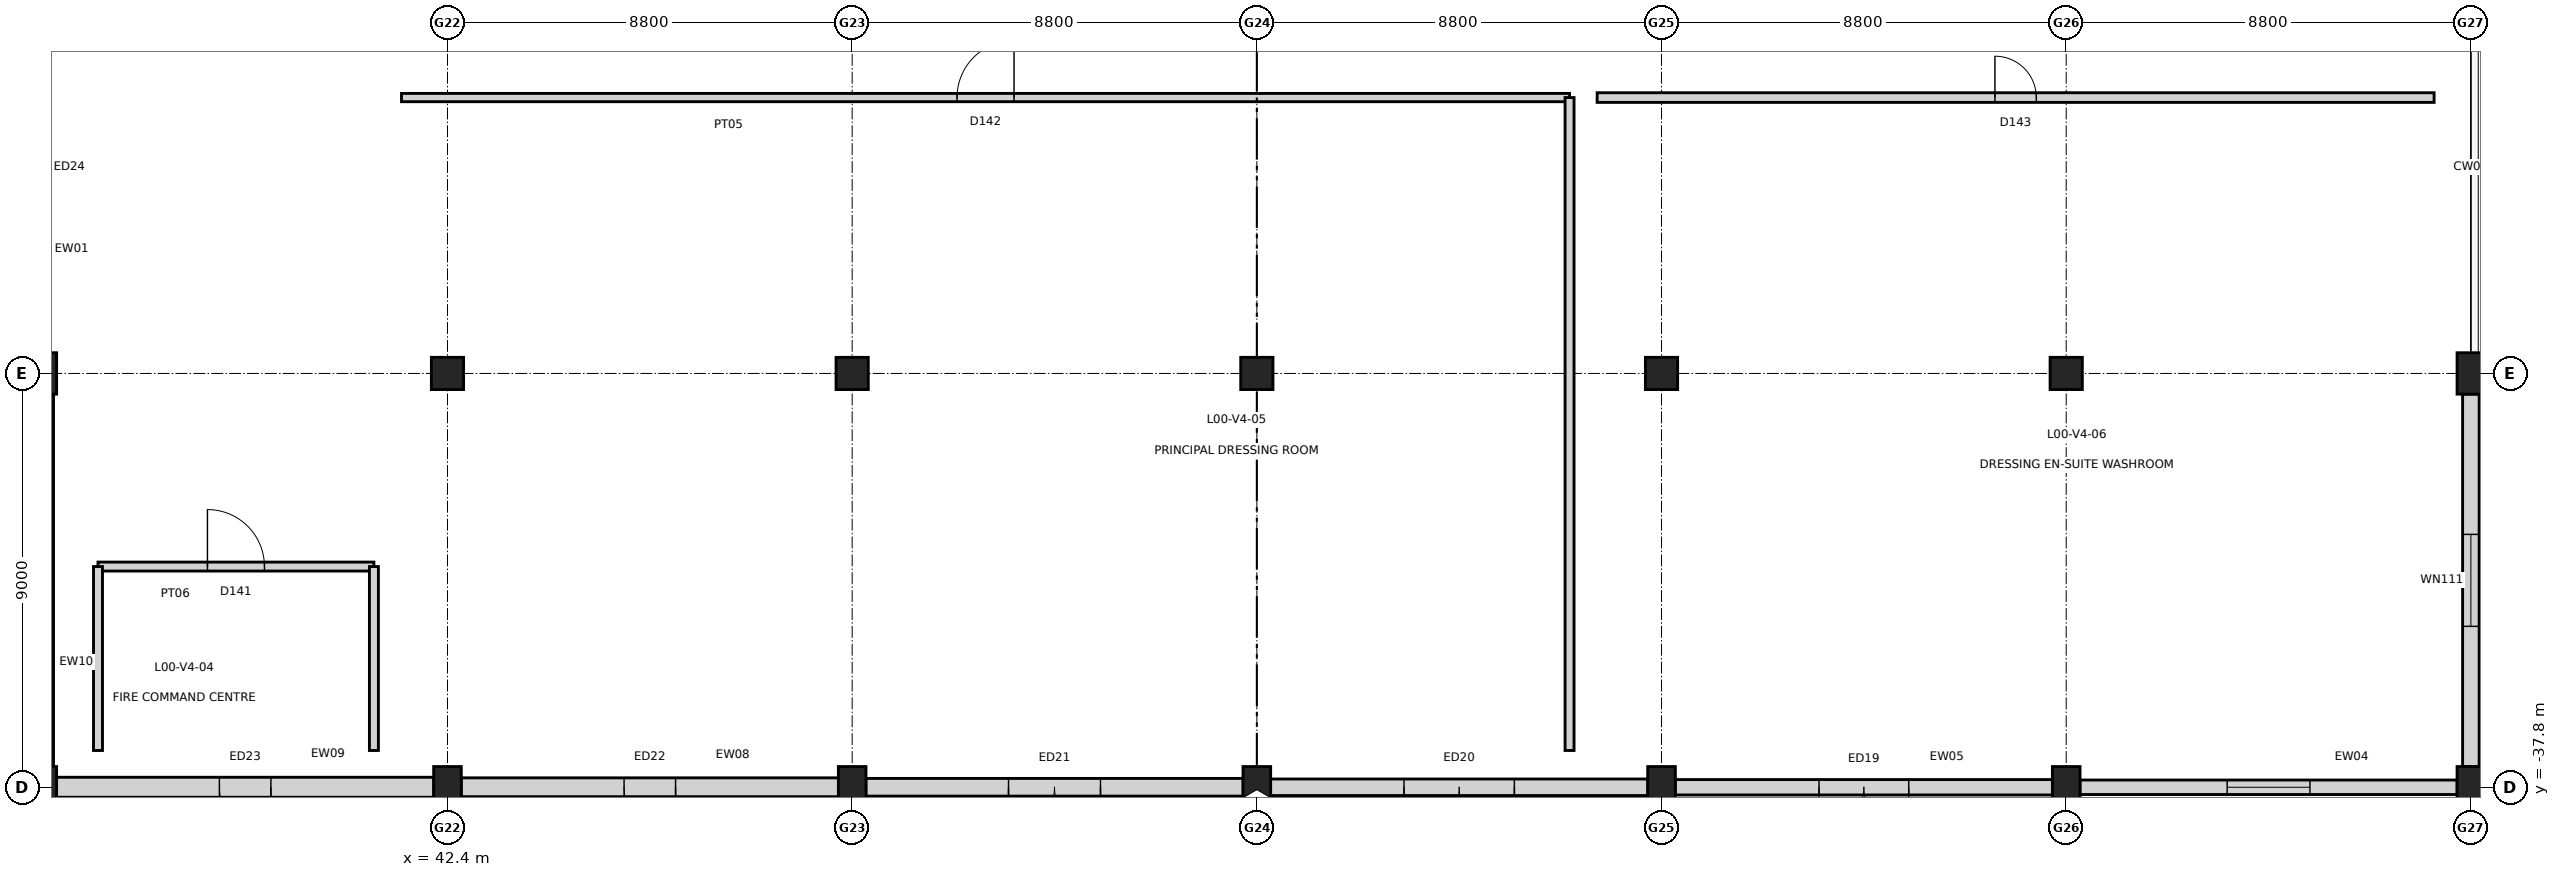
"""IFC4 building model, lengths in metres.
Left out: names, types, materials, properties, quantities, classifications, styles, units other than length and angle.
Written with IfcOpenShell. Run it as: python <this file> out.ifc"""

import sys

from ifc_helpers import new_model, si_unit, direction, frame, frame_2d, origin, origin_2d, place, context, subcontext, project, spatial, rectangle, extrude, element, fill, save


model = new_model("IFC4")
c1 = context("Model", 3, precision=1e-05, world=origin(), true_north=direction((0.0, 1.0)))
c2 = subcontext(c1, "Body", "Model", "MODEL_VIEW")
j1 = project(units=[si_unit("LENGTHUNIT", "METRE"), si_unit("PLANEANGLEUNIT", "RADIAN")], contexts=[c1])
p1 = place(None, origin())
s1 = spatial("IfcSite", under=j1, at=p1, CompositionType="ELEMENT")
p2 = place(p1, origin())
s2 = spatial("IfcBuilding", under=s1, at=p2, CompositionType="ELEMENT")
p3 = place(p2, origin())
s3 = spatial("IfcBuildingStorey", under=s2, at=p3, CompositionType="ELEMENT", Elevation=0.0)
for number, where, z_axis, x_axis in (
    (1, (33.6, -37.8, 0.0), (0.0, 0.0, 1.0), (1.0, 0.0, 0.0)),
    (2, (33.6, -28.8, 0.0), (0.0, 0.0, 1.0), (1.0, 0.0, 0.0)),
    (3, (42.4, -37.8, 0.0), (0.0, 0.0, 1.0), (1.0, 0.0, 0.0)),
):
    element("IfcColumn", number, at=place(p3, frame(where, z_axis=z_axis, x_axis=x_axis)), inside=s3, PredefinedType="COLUMN", context=c2, shape_type="SweptSolid", body=[
        extrude(rectangle(XDim=0.6, YDim=0.9, at=origin_2d()), origin(), (0.0, 0.0, 1.0), 5.4),
    ])
p4 = place(p3, frame((42.4, -28.8, 0.0), z_axis=(0.0, 0.0, 1.0), x_axis=(1.0, 0.0, 0.0)))
e4 = element("IfcColumn", 4, at=p4, inside=s3, PredefinedType="COLUMN", context=c2, shape_type="SweptSolid", body=[
    extrude(rectangle(XDim=0.7, YDim=0.7, at=origin_2d()), origin(), (0.0, 0.0, 1.0), 5.4),
])
p5 = place(p3, frame((51.2, -37.8, 0.0), z_axis=(0.0, 0.0, 1.0), x_axis=(1.0, 0.0, 0.0)))
e5 = element("IfcColumn", 5, at=p5, inside=s3, PredefinedType="COLUMN", context=c2, shape_type="SweptSolid", body=[
    extrude(rectangle(XDim=0.6, YDim=0.9, at=origin_2d()), origin(), (0.0, 0.0, 1.0), 5.4),
])
p6 = place(p3, frame((51.2, -28.8, 0.0), z_axis=(0.0, 0.0, 1.0), x_axis=(1.0, 0.0, 0.0)))
e6 = element("IfcColumn", 6, at=p6, inside=s3, PredefinedType="COLUMN", context=c2, shape_type="SweptSolid", body=[
    extrude(rectangle(XDim=0.7, YDim=0.7, at=origin_2d()), origin(), (0.0, 0.0, 1.0), 5.4),
])
p7 = place(p3, frame((60.0, -37.8, 0.0), z_axis=(0.0, 0.0, 1.0), x_axis=(1.0, 0.0, 0.0)))
e7 = element("IfcColumn", 7, at=p7, inside=s3, PredefinedType="COLUMN", context=c2, shape_type="SweptSolid", body=[
    extrude(rectangle(XDim=0.6, YDim=0.9, at=origin_2d()), origin(), (0.0, 0.0, 1.0), 5.4),
])
p8 = place(p3, frame((60.0, -28.8, 0.0), z_axis=(0.0, 0.0, 1.0), x_axis=(1.0, 0.0, 0.0)))
e8 = element("IfcColumn", 8, at=p8, inside=s3, PredefinedType="COLUMN", context=c2, shape_type="SweptSolid", body=[
    extrude(rectangle(XDim=0.7, YDim=0.7, at=origin_2d()), origin(), (0.0, 0.0, 1.0), 5.4),
])
p9 = place(p3, frame((68.8, -37.8, 0.0), z_axis=(0.0, 0.0, 1.0), x_axis=(1.0, 0.0, 0.0)))
e9 = element("IfcColumn", 9, at=p9, inside=s3, PredefinedType="COLUMN", context=c2, shape_type="SweptSolid", body=[
    extrude(rectangle(XDim=0.6, YDim=0.9, at=origin_2d()), origin(), (0.0, 0.0, 1.0), 5.4),
])
p10 = place(p3, frame((68.8, -28.8, 0.0), z_axis=(0.0, 0.0, 1.0), x_axis=(1.0, 0.0, 0.0)))
e10 = element("IfcColumn", 10, at=p10, inside=s3, PredefinedType="COLUMN", context=c2, shape_type="SweptSolid", body=[
    extrude(rectangle(XDim=0.7, YDim=0.7, at=origin_2d()), origin(), (0.0, 0.0, 1.0), 5.4),
])
p11 = place(p3, frame((77.6, -37.8, 0.0), z_axis=(0.0, 0.0, 1.0), x_axis=(1.0, 0.0, 0.0)))
e11 = element("IfcColumn", 11, at=p11, inside=s3, PredefinedType="COLUMN", context=c2, shape_type="SweptSolid", body=[
    extrude(rectangle(XDim=0.6, YDim=0.9, at=origin_2d()), origin(), (0.0, 0.0, 1.0), 5.4),
])
p12 = place(p3, frame((77.6, -28.8, 0.0), z_axis=(0.0, 0.0, 1.0), x_axis=(1.0, 0.0, 0.0)))
e12 = element("IfcColumn", 12, at=p12, inside=s3, PredefinedType="COLUMN", context=c2, shape_type="SweptSolid", body=[
    extrude(rectangle(XDim=0.7, YDim=0.7, at=origin_2d()), origin(), (0.0, 0.0, 1.0), 5.4),
])
for number, where, z_axis, x_axis in (
    (13, (86.4, -37.8, 0.0), (0.0, 0.0, 1.0), (1.0, 0.0, 0.0)),
    (14, (86.4, -28.8, 0.0), (0.0, 0.0, 1.0), (1.0, 0.0, 0.0)),
):
    element("IfcColumn", number, at=place(p3, frame(where, z_axis=z_axis, x_axis=x_axis)), inside=s3, PredefinedType="COLUMN", context=c2, shape_type="SweptSolid", body=[
        extrude(rectangle(XDim=0.6, YDim=0.9, at=origin_2d()), origin(), (0.0, 0.0, 1.0), 5.4),
    ])
p13 = place(p3, frame((86.102, -37.8, 0.0), z_axis=(0.0, 0.0, 1.0), x_axis=(-1.0, 0.0, 0.0)))
e15 = element("IfcWall", 15, at=p13, inside=s3, PredefinedType="STANDARD", context=c2, shape_type="SweptSolid", body=[
    extrude(rectangle(XDim=8.204, YDim=0.315, at=frame_2d((4.102, 0.0))), origin(), (0.0, 0.0, 1.0), 4.32),
])
p14 = place(p13, frame((3.202, 0.0, 0.6)))
e16 = element("IfcOpeningElement", 16, at=p14, cuts=e15, PredefinedType="OPENING", context=c2, shape_type="SweptSolid", body=[
    extrude(rectangle(XDim=1.8, YDim=2.35, at=frame_2d((0.9, 1.175))), frame((0.0, 0.167, 0.0), z_axis=(0.0, -1.0, 0.0), x_axis=(1.0, 0.0, 0.0)), (0.0, 0.0, 1.0), 0.335),
])
p15 = place(p3, frame((77.302, -37.8, 0.0), z_axis=(0.0, 0.0, 1.0), x_axis=(-1.0, 0.0, 0.0)))
e17 = element("IfcWall", 17, at=p15, inside=s3, PredefinedType="STANDARD", context=c2, shape_type="SweptSolid", body=[
    extrude(rectangle(XDim=8.204, YDim=0.335, at=frame_2d((4.102, 0.0))), origin(), (0.0, 0.0, 1.0), 4.32),
])
p16 = place(p15, frame((3.127, 0.0, 0.0)))
e18 = element("IfcOpeningElement", 18, at=p16, cuts=e17, PredefinedType="OPENING", context=c2, shape_type="SweptSolid", body=[
    extrude(rectangle(XDim=1.95, YDim=2.35, at=frame_2d((0.975, 1.175))), frame((0.0, 0.177, 0.0), z_axis=(0.0, -1.0, 0.0), x_axis=(1.0, 0.0, 0.0)), (0.0, 0.0, 1.0), 0.355),
])
p17 = place(p3, frame((68.502, -37.8, 0.0), z_axis=(0.0, 0.0, 1.0), x_axis=(-1.0, 0.0, 0.0)))
e19 = element("IfcWall", 19, at=p17, inside=s3, PredefinedType="STANDARD", context=c2, shape_type="SweptSolid", body=[
    extrude(rectangle(XDim=8.204, YDim=0.36, at=frame_2d((4.102, 0.0))), origin(), (0.0, 0.0, 1.0), 4.32),
])
p18 = place(p17, frame((2.902, 0.0, 0.0)))
e20 = element("IfcOpeningElement", 20, at=p18, cuts=e19, PredefinedType="OPENING", context=c2, shape_type="SweptSolid", body=[
    extrude(rectangle(XDim=2.4, YDim=2.5, at=frame_2d((1.2, 1.25))), frame((0.0, 0.19, 0.0), z_axis=(0.0, -1.0, 0.0), x_axis=(1.0, 0.0, 0.0)), (0.0, 0.0, 1.0), 0.38),
])
p19 = place(p3, frame((59.702, -37.8, 0.0), z_axis=(0.0, 0.0, 1.0), x_axis=(-1.0, 0.0, 0.0)))
e21 = element("IfcWall", 21, at=p19, inside=s3, PredefinedType="STANDARD", context=c2, shape_type="SweptSolid", body=[
    extrude(rectangle(XDim=8.204, YDim=0.385, at=frame_2d((4.102, 0.0))), origin(), (0.0, 0.0, 1.0), 4.32),
])
p20 = place(p19, frame((3.102, 0.0, 0.0)))
e22 = element("IfcOpeningElement", 22, at=p20, cuts=e21, PredefinedType="OPENING", context=c2, shape_type="SweptSolid", body=[
    extrude(rectangle(XDim=2.0, YDim=2.4, at=frame_2d((1.0, 1.2))), frame((0.0, 0.202, 0.0), z_axis=(0.0, -1.0, 0.0), x_axis=(1.0, 0.0, 0.0)), (0.0, 0.0, 1.0), 0.405),
])
p21 = place(p3, frame((50.902, -37.8, 0.0), z_axis=(0.0, 0.0, 1.0), x_axis=(-1.0, 0.0, 0.0)))
e23 = element("IfcWall", 23, at=p21, inside=s3, PredefinedType="STANDARD", context=c2, shape_type="SweptSolid", body=[
    extrude(rectangle(XDim=8.204, YDim=0.41, at=frame_2d((4.102, 0.0))), origin(), (0.0, 0.0, 1.0), 4.32),
])
p22 = place(p21, frame((3.542, 0.0, 0.0)))
e24 = element("IfcOpeningElement", 24, at=p22, cuts=e23, PredefinedType="OPENING", context=c2, shape_type="SweptSolid", body=[
    extrude(rectangle(XDim=1.12, YDim=2.2, at=frame_2d((0.56, 1.1))), frame((0.0, 0.215, 0.0), z_axis=(0.0, -1.0, 0.0), x_axis=(1.0, 0.0, 0.0)), (0.0, 0.0, 1.0), 0.43),
])
p23 = place(p3, frame((42.102, -37.8, 0.0), z_axis=(0.0, 0.0, 1.0), x_axis=(-1.0, 0.0, 0.0)))
e25 = element("IfcWall", 25, at=p23, inside=s3, PredefinedType="STANDARD", context=c2, shape_type="SweptSolid", body=[
    extrude(rectangle(XDim=8.204, YDim=0.435, at=frame_2d((4.102, 0.0))), origin(), (0.0, 0.0, 1.0), 4.32),
])
p24 = place(p23, frame((3.542, 0.0, 0.0)))
e26 = element("IfcOpeningElement", 26, at=p24, cuts=e25, PredefinedType="OPENING", context=c2, shape_type="SweptSolid", body=[
    extrude(rectangle(XDim=1.12, YDim=2.2, at=frame_2d((0.56, 1.1))), frame((0.0, 0.228, 0.0), z_axis=(0.0, -1.0, 0.0), x_axis=(1.0, 0.0, 0.0)), (0.0, 0.0, 1.0), 0.455),
])
p25 = place(p3, frame((33.6, -37.352, 0.0), z_axis=(0.0, 0.0, 1.0), x_axis=(0.0, 1.0, 0.0)))
e27 = element("IfcWall", 27, at=p25, inside=s3, PredefinedType="STANDARD", context=c2, shape_type="SweptSolid", body=[
    extrude(rectangle(XDim=8.104, YDim=0.465, at=frame_2d((4.052, 0.0))), origin(), (0.0, 0.0, 1.0), 4.404),
])
p26 = place(p25, frame((3.002, 0.0, 0.6)))
e28 = element("IfcOpeningElement", 28, at=p26, cuts=e27, PredefinedType="OPENING", context=c2, shape_type="SweptSolid", body=[
    extrude(rectangle(XDim=2.1, YDim=2.35, at=frame_2d((1.05, 1.175))), frame((0.0, 0.242, 0.0), z_axis=(0.0, -1.0, 0.0), x_axis=(1.0, 0.0, 0.0)), (0.0, 0.0, 1.0), 0.485),
])
p27 = place(p3, frame((86.4, -29.248, 0.0), z_axis=(0.0, 0.0, 1.0), x_axis=(0.0, -1.0, 0.0)))
e29 = element("IfcWall", 29, at=p27, inside=s3, PredefinedType="STANDARD", context=c2, shape_type="SweptSolid", body=[
    extrude(rectangle(XDim=8.104, YDim=0.36, at=frame_2d((4.052, 0.0))), origin(), (0.0, 0.0, 1.0), 4.404),
])
p28 = place(p27, frame((3.052, 0.0, 0.85)))
e30 = element("IfcOpeningElement", 30, at=p28, cuts=e29, PredefinedType="OPENING", context=c2, shape_type="SweptSolid", body=[
    extrude(rectangle(XDim=2.0, YDim=1.85, at=frame_2d((1.0, 0.925))), frame((0.0, 0.19, 0.0), z_axis=(0.0, -1.0, 0.0), x_axis=(1.0, 0.0, 0.0)), (0.0, 0.0, 1.0), 0.38),
])
p29 = place(p3, frame((34.8, -33.0, 0.0), z_axis=(0.0, 0.0, 1.0), x_axis=(1.0, 0.0, 0.0)))
e31 = element("IfcWall", 31, at=p29, inside=s3, PredefinedType="PARTITIONING", context=c2, shape_type="SweptSolid", body=[
    extrude(rectangle(XDim=6.0, YDim=0.195, at=frame_2d((3.0, 0.0))), origin(), (0.0, 0.0, 1.0), 5.02),
])
p30 = place(p29, frame((2.38, 0.0, 0.0)))
e32 = element("IfcOpeningElement", 32, at=p30, cuts=e31, PredefinedType="OPENING", context=c2, shape_type="SweptSolid", body=[
    extrude(rectangle(XDim=1.24, YDim=2.2, at=frame_2d((0.62, 1.1))), frame((0.0, 0.107, 0.0), z_axis=(0.0, -1.0, 0.0), x_axis=(1.0, 0.0, 0.0)), (0.0, 0.0, 1.0), 0.215),
])
for number, where, z_axis, x_axis in (
    (33, (34.8, -37.0, 0.0), (0.0, 0.0, 1.0), (0.0, 1.0, 0.0)),
    (34, (40.8, -37.0, 0.0), (0.0, 0.0, 1.0), (0.0, 1.0, 0.0)),
):
    element("IfcWall", number, at=place(p3, frame(where, z_axis=z_axis, x_axis=x_axis)), inside=s3, PredefinedType="PARTITIONING", context=c2, shape_type="SweptSolid", body=[
        extrude(rectangle(XDim=4.0, YDim=0.195, at=frame_2d((2.0, 0.0))), origin(), (0.0, 0.0, 1.0), 5.02),
    ])
p31 = place(p3, frame((41.4, -22.8, 0.0), z_axis=(0.0, 0.0, 1.0), x_axis=(1.0, 0.0, 0.0)))
e35 = element("IfcWall", 35, at=p31, inside=s3, PredefinedType="PARTITIONING", context=c2, shape_type="SweptSolid", body=[
    extrude(rectangle(XDim=25.4, YDim=0.18, at=frame_2d((12.7, 0.0))), origin(), (0.0, 0.0, 1.0), 5.02),
])
p32 = place(p31, frame((12.08, 0.0, 0.0)))
e36 = element("IfcOpeningElement", 36, at=p32, cuts=e35, PredefinedType="OPENING", context=c2, shape_type="SweptSolid", body=[
    extrude(rectangle(XDim=1.24, YDim=2.2, at=frame_2d((0.62, 1.1))), frame((0.0, 0.1, 0.0), z_axis=(0.0, -1.0, 0.0), x_axis=(1.0, 0.0, 0.0)), (0.0, 0.0, 1.0), 0.2),
])
p33 = place(p3, frame((66.8, -37.0, 0.0), z_axis=(0.0, 0.0, 1.0), x_axis=(0.0, 1.0, 0.0)))
e37 = element("IfcWall", 37, at=p33, inside=s3, PredefinedType="PARTITIONING", context=c2, shape_type="SweptSolid", body=[
    extrude(rectangle(XDim=14.2, YDim=0.195, at=frame_2d((7.1, 0.0))), origin(), (0.0, 0.0, 1.0), 5.02),
])
p34 = place(p3, frame((67.4, -22.8, 0.0), z_axis=(0.0, 0.0, 1.0), x_axis=(1.0, 0.0, 0.0)))
e38 = element("IfcWall", 38, at=p34, inside=s3, PredefinedType="PARTITIONING", context=c2, shape_type="SweptSolid", body=[
    extrude(rectangle(XDim=18.2, YDim=0.21, at=frame_2d((9.1, 0.0))), origin(), (0.0, 0.0, 1.0), 5.02),
])
p35 = place(p34, frame((8.65, 0.0, 0.0)))
e39 = element("IfcOpeningElement", 39, at=p35, cuts=e38, PredefinedType="OPENING", context=c2, shape_type="SweptSolid", body=[
    extrude(rectangle(XDim=0.9, YDim=2.1, at=frame_2d((0.45, 1.05))), frame((0.0, 0.115, 0.0), z_axis=(0.0, -1.0, 0.0), x_axis=(1.0, 0.0, 0.0)), (0.0, 0.0, 1.0), 0.23),
])
p36 = place(p14, origin())
e40 = element("IfcWindow", 40, at=p36, inside=s3, PartitioningType="SINGLE_PANEL", PredefinedType="WINDOW", context=c2, shape_type="SweptSolid", body=[
    extrude(rectangle(XDim=1.8, YDim=2.35, at=frame_2d((0.9, 1.175))), frame((0.0, 0.03, 0.0), z_axis=(0.0, -1.0, 0.0), x_axis=(1.0, 0.0, 0.0)), (0.0, 0.0, 1.0), 0.06),
])
fill(e16, e40)
p37 = place(p16, origin())
e41 = element("IfcDoor", 41, at=p37, inside=s3, OperationType="DOUBLE_DOOR_SINGLE_SWING", PredefinedType="DOOR", context=c2, shape_type="SweptSolid", body=[
    extrude(rectangle(XDim=1.95, YDim=2.35, at=frame_2d((0.975, 1.175))), frame((0.0, 0.025, 0.0), z_axis=(0.0, -1.0, 0.0), x_axis=(1.0, 0.0, 0.0)), (0.0, 0.0, 1.0), 0.05),
])
fill(e18, e41)
p38 = place(p18, origin())
e42 = element("IfcDoor", 42, at=p38, inside=s3, OperationType="DOUBLE_DOOR_SINGLE_SWING", PredefinedType="DOOR", context=c2, shape_type="SweptSolid", body=[
    extrude(rectangle(XDim=2.4, YDim=2.5, at=frame_2d((1.2, 1.25))), frame((0.0, 0.025, 0.0), z_axis=(0.0, -1.0, 0.0), x_axis=(1.0, 0.0, 0.0)), (0.0, 0.0, 1.0), 0.05),
])
fill(e20, e42)
p39 = place(p20, origin())
e43 = element("IfcDoor", 43, at=p39, inside=s3, OperationType="DOUBLE_DOOR_SINGLE_SWING", PredefinedType="DOOR", context=c2, shape_type="SweptSolid", body=[
    extrude(rectangle(XDim=2.0, YDim=2.4, at=frame_2d((1.0, 1.2))), frame((0.0, 0.025, 0.0), z_axis=(0.0, -1.0, 0.0), x_axis=(1.0, 0.0, 0.0)), (0.0, 0.0, 1.0), 0.05),
])
fill(e22, e43)
p40 = place(p22, origin())
e44 = element("IfcDoor", 44, at=p40, inside=s3, OperationType="SINGLE_SWING_LEFT", PredefinedType="DOOR", context=c2, shape_type="SweptSolid", body=[
    extrude(rectangle(XDim=1.12, YDim=2.2, at=frame_2d((0.56, 1.1))), frame((0.0, 0.025, 0.0), z_axis=(0.0, -1.0, 0.0), x_axis=(1.0, 0.0, 0.0)), (0.0, 0.0, 1.0), 0.05),
])
fill(e24, e44)
p41 = place(p24, origin())
e45 = element("IfcDoor", 45, at=p41, inside=s3, OperationType="SINGLE_SWING_LEFT", PredefinedType="DOOR", context=c2, shape_type="SweptSolid", body=[
    extrude(rectangle(XDim=1.12, YDim=2.2, at=frame_2d((0.56, 1.1))), frame((0.0, 0.025, 0.0), z_axis=(0.0, -1.0, 0.0), x_axis=(1.0, 0.0, 0.0)), (0.0, 0.0, 1.0), 0.05),
])
fill(e26, e45)
p42 = place(p28, origin())
e46 = element("IfcWindow", 46, at=p42, inside=s3, PartitioningType="SINGLE_PANEL", PredefinedType="WINDOW", context=c2, shape_type="SweptSolid", body=[
    extrude(rectangle(XDim=2.0, YDim=1.85, at=frame_2d((1.0, 0.925))), frame((0.0, 0.03, 0.0), z_axis=(0.0, -1.0, 0.0), x_axis=(1.0, 0.0, 0.0)), (0.0, 0.0, 1.0), 0.06),
])
fill(e30, e46)
p43 = place(p30, origin())
e47 = element("IfcDoor", 47, at=p43, inside=s3, OperationType="SINGLE_SWING_LEFT", PredefinedType="DOOR", context=c2, shape_type="SweptSolid", body=[
    extrude(rectangle(XDim=1.24, YDim=2.2, at=frame_2d((0.62, 1.1))), frame((0.0, 0.025, 0.0), z_axis=(0.0, -1.0, 0.0), x_axis=(1.0, 0.0, 0.0)), (0.0, 0.0, 1.0), 0.05),
])
fill(e32, e47)
p44 = place(p32, origin())
e48 = element("IfcDoor", 48, at=p44, inside=s3, OperationType="SINGLE_SWING_RIGHT", PredefinedType="DOOR", context=c2, shape_type="SweptSolid", body=[
    extrude(rectangle(XDim=1.24, YDim=2.2, at=frame_2d((0.62, 1.1))), frame((0.0, 0.025, 0.0), z_axis=(0.0, -1.0, 0.0), x_axis=(1.0, 0.0, 0.0)), (0.0, 0.0, 1.0), 0.05),
])
fill(e36, e48)
p45 = place(p35, origin())
e49 = element("IfcDoor", 49, at=p45, inside=s3, OperationType="SINGLE_SWING_LEFT", PredefinedType="DOOR", context=c2, shape_type="SweptSolid", body=[
    extrude(rectangle(XDim=0.9, YDim=2.1, at=frame_2d((0.45, 1.05))), frame((0.0, 0.025, 0.0), z_axis=(0.0, -1.0, 0.0), x_axis=(1.0, 0.0, 0.0)), (0.0, 0.0, 1.0), 0.05),
])
fill(e39, e49)
save(model, sys.argv[1])
